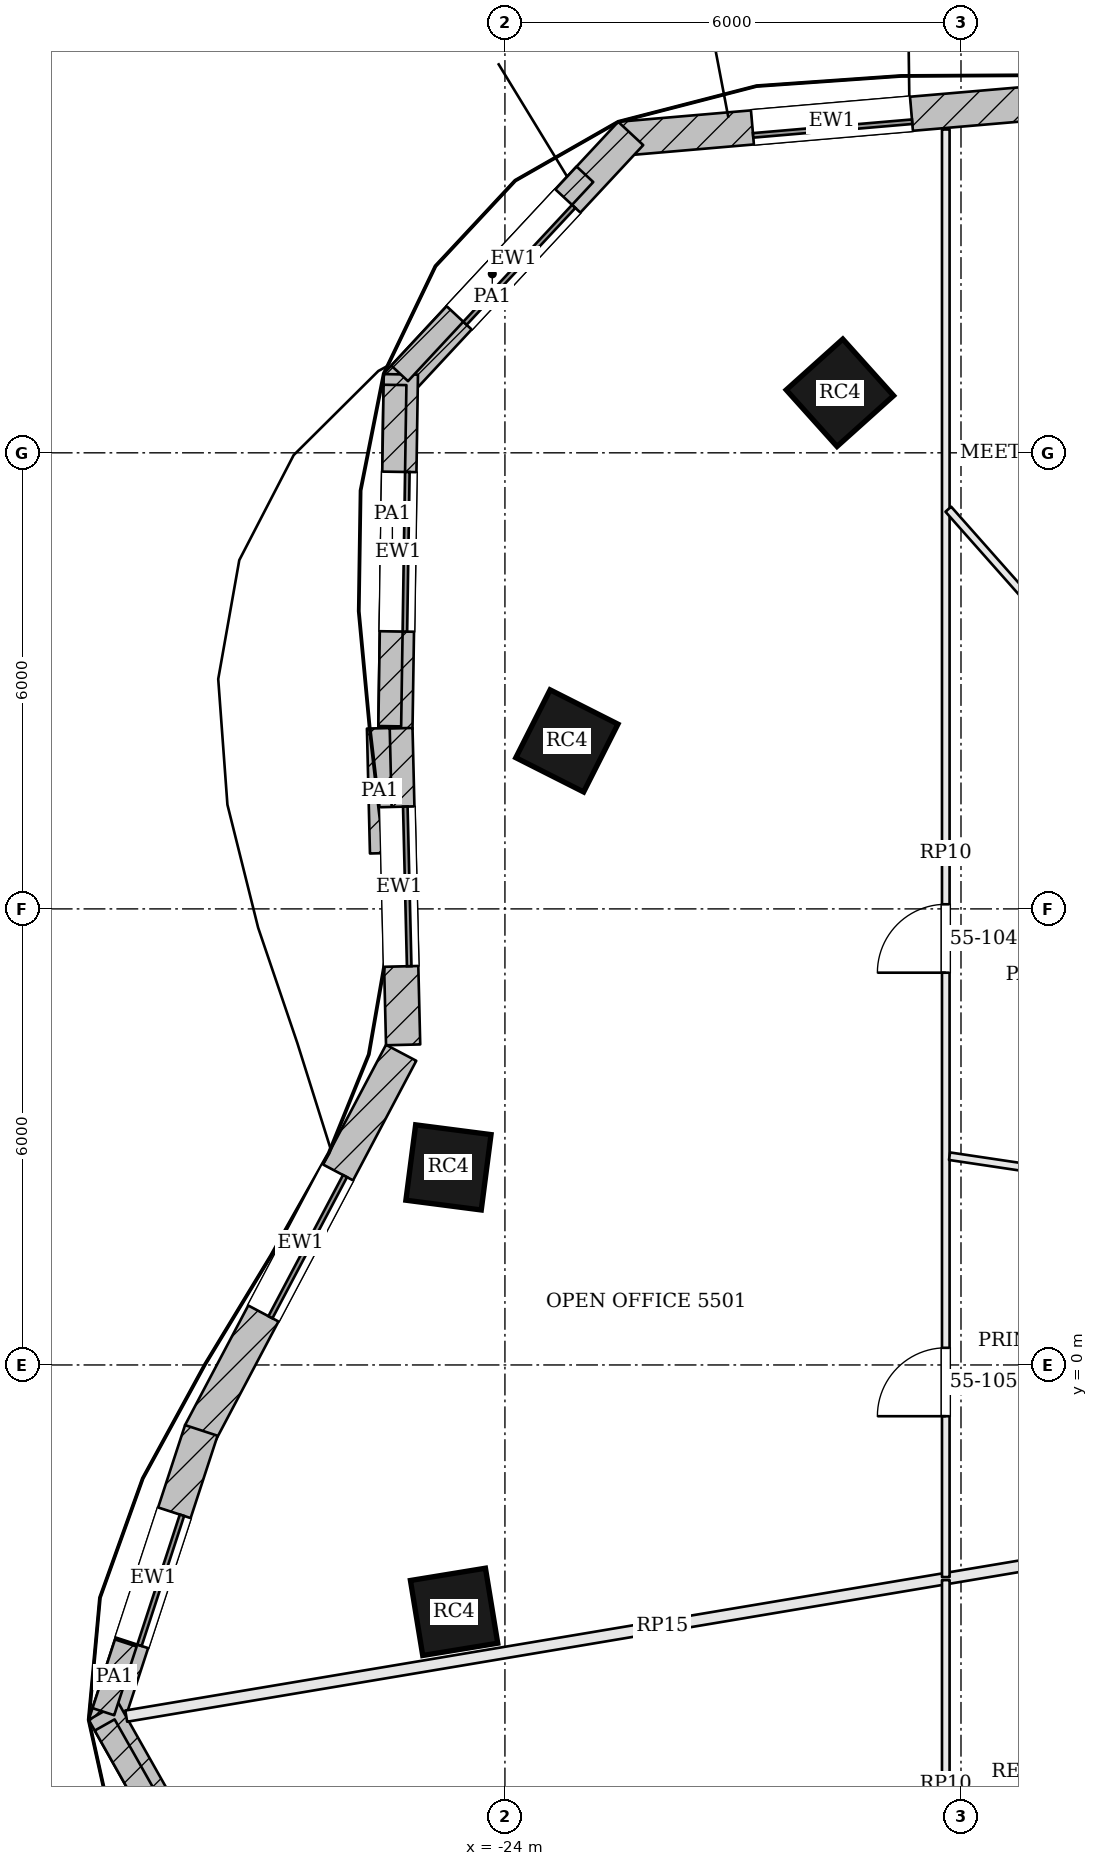
"""IFC4 building model, lengths in metres.
Left out: names, types, materials, properties, quantities, classifications, styles, units other than length and angle.
Written with IfcOpenShell. Run it as: python <this file> out.ifc"""

import sys

from ifc_helpers import new_model, si_unit, direction, frame, frame_2d, origin, origin_2d, place, context, subcontext, project, spatial, rectangle, extrude, element, fill, save


model = new_model("IFC4")
c1 = context("Model", 3, precision=1e-05, world=origin(), true_north=direction((0.0, 1.0)))
c2 = subcontext(c1, "Body", "Model", "MODEL_VIEW")
j1 = project(units=[si_unit("LENGTHUNIT", "METRE"), si_unit("PLANEANGLEUNIT", "RADIAN")], contexts=[c1])
p1 = place(None, origin())
s1 = spatial("IfcSite", under=j1, at=p1, CompositionType="ELEMENT")
p2 = place(p1, origin())
s2 = spatial("IfcBuilding", under=s1, at=p2, CompositionType="ELEMENT")
p3 = place(p2, frame((0.0, 0.0, 225.3)))
s3 = spatial("IfcBuildingStorey", under=s2, at=p3, CompositionType="ELEMENT", Elevation=225.3)
for number, where, z_axis, x_axis in (
    (1, (-19.593, 12.79, 0.0), (0.0, 0.0, 1.0), (-0.744, -0.668, 0.0)),
    (2, (-23.185, 8.21, 0.0), (0.0, 0.0, 1.0), (-0.451, -0.893, 0.0)),
    (3, (-24.743, 2.599, 0.0), (0.0, 0.0, 1.0), (-0.128, -0.992, 0.0)),
    (4, (-24.669, -3.248, 0.0), (0.0, 0.0, 1.0), (0.162, -0.987, 0.0)),
):
    element("IfcColumn", number, at=place(p3, frame(where, z_axis=z_axis, x_axis=x_axis)), inside=s3, PredefinedType="COLUMN", context=c2, shape_type="SweptSolid", body=[
        extrude(rectangle(XDim=1.0, YDim=1.0, at=origin_2d()), origin(), (0.0, 0.0, 1.0), 3.9),
    ])
p4 = place(p3, frame((-16.91, 16.61, 0.0), z_axis=(0.0, 0.0, 1.0), x_axis=(-0.996333165816, -0.085558299972, 0.0)))
e5 = element("IfcWall", 5, at=p4, inside=s3, PredefinedType="SOLIDWALL", context=c2, shape_type="SweptSolid", body=[
    extrude(rectangle(XDim=5.596, YDim=0.45, at=frame_2d((2.798, 0.0))), origin(), (0.0, 0.0, 1.0), 3.7),
])
p5 = place(p4, frame((1.748, 0.0, 0.9)))
e6 = element("IfcOpeningElement", 6, at=p5, cuts=e5, PredefinedType="OPENING", context=c2, shape_type="SweptSolid", body=[
    extrude(rectangle(XDim=2.1, YDim=2.3, at=frame_2d((1.05, 1.15))), frame((0.0, 0.235, 0.0), z_axis=(0.0, -1.0, 0.0), x_axis=(1.0, 0.0, 0.0)), (0.0, 0.0, 1.0), 0.47),
])
p6 = place(p3, frame((-22.345, 16.202, 0.0), z_axis=(0.0, 0.0, 1.0), x_axis=(-0.681249161265, -0.732051624051, 0.0)))
e7 = element("IfcWall", 7, at=p6, inside=s3, PredefinedType="SOLIDWALL", context=c2, shape_type="SweptSolid", body=[
    extrude(rectangle(XDim=4.527, YDim=0.45, at=frame_2d((2.263, 0.0))), origin(), (0.0, 0.0, 1.0), 3.7),
])
p7 = place(p6, frame((1.213, 0.0, 0.9)))
e8 = element("IfcOpeningElement", 8, at=p7, cuts=e7, PredefinedType="OPENING", context=c2, shape_type="SweptSolid", body=[
    extrude(rectangle(XDim=2.1, YDim=2.3, at=frame_2d((1.05, 1.15))), frame((0.0, 0.235, 0.0), z_axis=(0.0, -1.0, 0.0), x_axis=(1.0, 0.0, 0.0)), (0.0, 0.0, 1.0), 0.47),
])
p8 = place(p3, frame((-25.369, 13.032, 0.0), z_axis=(0.0, 0.0, 1.0), x_axis=(-0.015383599855, -0.999881665426, 0.0)))
e9 = element("IfcWall", 9, at=p8, inside=s3, PredefinedType="SOLIDWALL", context=c2, shape_type="SweptSolid", body=[
    extrude(rectangle(XDim=4.666, YDim=0.45, at=frame_2d((2.333, 0.0))), origin(), (0.0, 0.0, 1.0), 3.7),
])
p9 = place(p8, frame((1.283, 0.0, 0.9)))
e10 = element("IfcOpeningElement", 10, at=p9, cuts=e9, PredefinedType="OPENING", context=c2, shape_type="SweptSolid", body=[
    extrude(rectangle(XDim=2.1, YDim=2.3, at=frame_2d((1.05, 1.15))), frame((0.0, 0.235, 0.0), z_axis=(0.0, -1.0, 0.0), x_axis=(1.0, 0.0, 0.0)), (0.0, 0.0, 1.0), 0.47),
])
p10 = place(p3, frame((-25.441, 8.375, 0.0), z_axis=(0.0, 0.0, 1.0), x_axis=(0.024385850259, -0.999702620936, 0.0)))
e11 = element("IfcWall", 11, at=p10, inside=s3, PredefinedType="SOLIDWALL", context=c2, shape_type="SweptSolid", body=[
    extrude(rectangle(XDim=4.165, YDim=0.45, at=frame_2d((2.083, 0.0))), origin(), (0.0, 0.0, 1.0), 3.7),
])
p11 = place(p10, frame((1.032, 0.0, 0.9)))
e12 = element("IfcOpeningElement", 12, at=p11, cuts=e11, PredefinedType="OPENING", context=c2, shape_type="SweptSolid", body=[
    extrude(rectangle(XDim=2.1, YDim=2.3, at=frame_2d((1.05, 1.15))), frame((0.0, 0.235, 0.0), z_axis=(0.0, -1.0, 0.0), x_axis=(1.0, 0.0, 0.0)), (0.0, 0.0, 1.0), 0.47),
])
p12 = place(p3, frame((-25.365, 4.107, 0.0), z_axis=(0.0, 0.0, 1.0), x_axis=(-0.467239399168, -0.884130840919, 0.0)))
e13 = element("IfcWall", 13, at=p12, inside=s3, PredefinedType="SOLIDWALL", context=c2, shape_type="SweptSolid", body=[
    extrude(rectangle(XDim=5.659, YDim=0.45, at=frame_2d((2.83, 0.0))), origin(), (0.0, 0.0, 1.0), 3.7),
])
p13 = place(p12, frame((1.779, 0.0, 0.9)))
e14 = element("IfcOpeningElement", 14, at=p13, cuts=e13, PredefinedType="OPENING", context=c2, shape_type="SweptSolid", body=[
    extrude(rectangle(XDim=2.1, YDim=2.3, at=frame_2d((1.05, 1.15))), frame((0.0, 0.235, 0.0), z_axis=(0.0, -1.0, 0.0), x_axis=(1.0, 0.0, 0.0)), (0.0, 0.0, 1.0), 0.47),
])
p14 = place(p3, frame((-27.995, -0.861, 0.0), z_axis=(0.0, 0.0, 1.0), x_axis=(-0.310693110673, -0.950510279261, 0.0)))
e15 = element("IfcWall", 15, at=p14, inside=s3, PredefinedType="SOLIDWALL", context=c2, shape_type="SweptSolid", body=[
    extrude(rectangle(XDim=4.08, YDim=0.45, at=frame_2d((2.04, 0.0))), origin(), (0.0, 0.0, 1.0), 3.7),
])
p15 = place(p14, frame((1.14, 0.0, 0.9)))
e16 = element("IfcOpeningElement", 16, at=p15, cuts=e15, PredefinedType="OPENING", context=c2, shape_type="SweptSolid", body=[
    extrude(rectangle(XDim=1.8, YDim=2.3, at=frame_2d((0.9, 1.15))), frame((0.0, 0.235, 0.0), z_axis=(0.0, -1.0, 0.0), x_axis=(1.0, 0.0, 0.0)), (0.0, 0.0, 1.0), 0.47),
])
p16 = place(p3, frame((-29.28, -4.558, 0.0), z_axis=(0.0, 0.0, 1.0), x_axis=(0.491511608999, -0.870871022723, 0.0)))
e17 = element("IfcWall", 17, at=p16, inside=s3, PredefinedType="SOLIDWALL", context=c2, shape_type="SweptSolid", body=[
    extrude(rectangle(XDim=4.763, YDim=0.45, at=frame_2d((2.381, 0.0))), origin(), (0.0, 0.0, 1.0), 3.7),
])
p17 = place(p16, frame((1.332, 0.0, 0.9)))
e18 = element("IfcOpeningElement", 18, at=p17, cuts=e17, PredefinedType="OPENING", context=c2, shape_type="SweptSolid", body=[
    extrude(rectangle(XDim=2.1, YDim=2.3, at=frame_2d((1.05, 1.15))), frame((0.0, 0.235, 0.0), z_axis=(0.0, -1.0, 0.0), x_axis=(1.0, 0.0, 0.0)), (0.0, 0.0, 1.0), 0.47),
])
p18 = place(p3, frame((-22.948, 15.665, 3.9), z_axis=(0.0, 0.0, 1.0), x_axis=(-0.681269800001, -0.732032417046, 0.0)))
e19 = element("IfcWall", 19, at=p18, inside=s3, PredefinedType="PARAPET", context=c2, shape_type="SweptSolid", body=[
    extrude(rectangle(XDim=3.578, YDim=0.3, at=frame_2d((1.789, 0.0))), origin(), (0.0, 0.0, 1.0), 1.1),
])
p19 = place(p3, frame((-25.446, 12.893, 3.9), z_axis=(0.0, 0.0, 1.0), x_axis=(-0.015386139974, -0.999881626342, 0.0)))
e20 = element("IfcWall", 20, at=p19, inside=s3, PredefinedType="PARAPET", context=c2, shape_type="SweptSolid", body=[
    extrude(rectangle(XDim=4.49, YDim=0.3, at=frame_2d((2.245, 0.0))), origin(), (0.0, 0.0, 1.0), 1.1),
])
p20 = place(p3, frame((-25.666, 8.376, 3.9), z_axis=(0.0, 0.0, 1.0), x_axis=(0.024357650064, -0.999703308429, 0.0)))
e21 = element("IfcWall", 21, at=p20, inside=s3, PredefinedType="PARAPET", context=c2, shape_type="SweptSolid", body=[
    extrude(rectangle(XDim=1.644, YDim=0.3, at=frame_2d((0.822, 0.0))), origin(), (0.0, 0.0, 1.0), 1.1),
])
p21 = place(p3, frame((-28.988, -3.657, 3.9), z_axis=(0.0, 0.0, 1.0), x_axis=(-0.310832502734, -0.950464704891, 0.0)))
e22 = element("IfcWall", 22, at=p21, inside=s3, PredefinedType="PARAPET", context=c2, shape_type="SweptSolid", body=[
    extrude(rectangle(XDim=0.951, YDim=0.3, at=frame_2d((0.476, 0.0))), origin(), (0.0, 0.0, 1.0), 1.1),
])
p22 = place(p3, frame((-29.266, -4.737, 3.9), z_axis=(0.0, 0.0, 1.0), x_axis=(0.491480740547, -0.870888443873, 0.0)))
e23 = element("IfcWall", 23, at=p22, inside=s3, PredefinedType="PARAPET", context=c2, shape_type="SweptSolid", body=[
    extrude(rectangle(XDim=4.494, YDim=0.3, at=frame_2d((2.247, 0.0))), origin(), (0.0, 0.0, 1.0), 1.1),
])
p23 = place(p3, frame((-28.982, -4.62, 0.0), z_axis=(0.0, 0.0, 1.0), x_axis=(0.986213908907, 0.165475454008, 0.0)))
e24 = element("IfcWall", 24, at=p23, inside=s3, PredefinedType="PARTITIONING", context=c2, shape_type="SweptSolid", body=[
    extrude(rectangle(XDim=14.305, YDim=0.15, at=frame_2d((7.153, 0.0))), origin(), (0.0, 0.0, 1.0), 3.184),
])
p24 = place(p3, frame((-18.2, -2.79, 0.0), z_axis=(0.0, 0.0, 1.0), x_axis=(0.0, 1.0, 0.0)))
e25 = element("IfcWall", 25, at=p24, inside=s3, PredefinedType="PARTITIONING", context=c2, shape_type="SweptSolid", body=[
    extrude(rectangle(XDim=19.044, YDim=0.1, at=frame_2d((9.522, 0.0))), origin(), (0.0, 0.0, 1.0), 3.084),
])
p25 = place(p24, frame((7.951, 0.0, 0.0)))
e26 = element("IfcOpeningElement", 26, at=p25, cuts=e25, PredefinedType="OPENING", context=c2, shape_type="SweptSolid", body=[
    extrude(rectangle(XDim=0.9, YDim=2.1, at=frame_2d((0.45, 1.05))), frame((0.0, 0.06, 0.0), z_axis=(0.0, -1.0, 0.0), x_axis=(1.0, 0.0, 0.0)), (0.0, 0.0, 1.0), 0.12),
])
p26 = place(p24, frame((2.116, 0.0, 0.0)))
e27 = element("IfcOpeningElement", 27, at=p26, cuts=e25, PredefinedType="OPENING", context=c2, shape_type="SweptSolid", body=[
    extrude(rectangle(XDim=0.9, YDim=2.1, at=frame_2d((0.45, 1.05))), frame((0.0, 0.06, 0.0), z_axis=(0.0, -1.0, 0.0), x_axis=(1.0, 0.0, 0.0)), (0.0, 0.0, 1.0), 0.12),
])
p27 = place(p3, frame((-14.85, 7.514, 0.0), z_axis=(0.0, 0.0, 1.0), x_axis=(-0.663136045348, 0.748498888015, 0.0)))
e28 = element("IfcWall", 28, at=p27, inside=s3, PredefinedType="PARTITIONING", context=c2, shape_type="SweptSolid", body=[
    extrude(rectangle(XDim=5.002, YDim=0.1, at=frame_2d((2.501, 0.0))), origin(), (0.0, 0.0, 1.0), 3.084),
])
p28 = place(p3, frame((-14.874, 2.257, 0.0), z_axis=(0.0, 0.0, 1.0), x_axis=(-0.989042600295, 0.147630399314, 0.0)))
e29 = element("IfcWall", 29, at=p28, inside=s3, PredefinedType="PARTITIONING", context=c2, shape_type="SweptSolid", body=[
    extrude(rectangle(XDim=3.312, YDim=0.1, at=frame_2d((1.656, 0.0))), origin(), (0.0, 0.0, 1.0), 3.084),
])
p29 = place(p3, frame((-18.2, -8.2, 0.0), z_axis=(0.0, 0.0, 1.0), x_axis=(0.0, 1.0, 0.0)))
e30 = element("IfcWall", 30, at=p29, inside=s3, PredefinedType="PARTITIONING", context=c2, shape_type="SweptSolid", body=[
    extrude(rectangle(XDim=5.369, YDim=0.1, at=frame_2d((2.685, 0.0))), origin(), (0.0, 0.0, 1.0), 3.084),
])
p30 = place(p5, origin())
e31 = element("IfcWindow", 31, at=p30, inside=s3, PartitioningType="SINGLE_PANEL", PredefinedType="WINDOW", context=c2, shape_type="SweptSolid", body=[
    extrude(rectangle(XDim=2.1, YDim=2.3, at=frame_2d((1.05, 1.15))), frame((0.0, 0.135, 0.0), z_axis=(0.0, -1.0, 0.0), x_axis=(1.0, 0.0, 0.0)), (0.0, 0.0, 1.0), 0.06),
])
fill(e6, e31)
p31 = place(p7, origin())
e32 = element("IfcWindow", 32, at=p31, inside=s3, PartitioningType="SINGLE_PANEL", PredefinedType="WINDOW", context=c2, shape_type="SweptSolid", body=[
    extrude(rectangle(XDim=2.1, YDim=2.3, at=frame_2d((1.05, 1.15))), frame((0.0, 0.135, 0.0), z_axis=(0.0, -1.0, 0.0), x_axis=(1.0, 0.0, 0.0)), (0.0, 0.0, 1.0), 0.06),
])
fill(e8, e32)
p32 = place(p9, origin())
e33 = element("IfcWindow", 33, at=p32, inside=s3, PartitioningType="SINGLE_PANEL", PredefinedType="WINDOW", context=c2, shape_type="SweptSolid", body=[
    extrude(rectangle(XDim=2.1, YDim=2.3, at=frame_2d((1.05, 1.15))), frame((0.0, 0.135, 0.0), z_axis=(0.0, -1.0, 0.0), x_axis=(1.0, 0.0, 0.0)), (0.0, 0.0, 1.0), 0.06),
])
fill(e10, e33)
p33 = place(p11, origin())
e34 = element("IfcWindow", 34, at=p33, inside=s3, PartitioningType="SINGLE_PANEL", PredefinedType="WINDOW", context=c2, shape_type="SweptSolid", body=[
    extrude(rectangle(XDim=2.1, YDim=2.3, at=frame_2d((1.05, 1.15))), frame((0.0, 0.135, 0.0), z_axis=(0.0, -1.0, 0.0), x_axis=(1.0, 0.0, 0.0)), (0.0, 0.0, 1.0), 0.06),
])
fill(e12, e34)
p34 = place(p13, origin())
e35 = element("IfcWindow", 35, at=p34, inside=s3, PartitioningType="SINGLE_PANEL", PredefinedType="WINDOW", context=c2, shape_type="SweptSolid", body=[
    extrude(rectangle(XDim=2.1, YDim=2.3, at=frame_2d((1.05, 1.15))), frame((0.0, 0.135, 0.0), z_axis=(0.0, -1.0, 0.0), x_axis=(1.0, 0.0, 0.0)), (0.0, 0.0, 1.0), 0.06),
])
fill(e14, e35)
p35 = place(p15, origin())
e36 = element("IfcWindow", 36, at=p35, inside=s3, PartitioningType="SINGLE_PANEL", PredefinedType="WINDOW", context=c2, shape_type="SweptSolid", body=[
    extrude(rectangle(XDim=1.8, YDim=2.3, at=frame_2d((0.9, 1.15))), frame((0.0, 0.135, 0.0), z_axis=(0.0, -1.0, 0.0), x_axis=(1.0, 0.0, 0.0)), (0.0, 0.0, 1.0), 0.06),
])
fill(e16, e36)
p36 = place(p25, origin())
e37 = element("IfcDoor", 37, at=p36, inside=s3, OperationType="SINGLE_SWING_LEFT", PredefinedType="DOOR", context=c2, shape_type="SweptSolid", body=[
    extrude(rectangle(XDim=0.9, YDim=2.1, at=frame_2d((0.45, 1.05))), frame((0.0, 0.025, 0.0), z_axis=(0.0, -1.0, 0.0), x_axis=(1.0, 0.0, 0.0)), (0.0, 0.0, 1.0), 0.05),
])
fill(e26, e37)
p37 = place(p26, origin())
e38 = element("IfcDoor", 38, at=p37, inside=s3, OperationType="SINGLE_SWING_LEFT", PredefinedType="DOOR", context=c2, shape_type="SweptSolid", body=[
    extrude(rectangle(XDim=0.9, YDim=2.1, at=frame_2d((0.45, 1.05))), frame((0.0, 0.025, 0.0), z_axis=(0.0, -1.0, 0.0), x_axis=(1.0, 0.0, 0.0)), (0.0, 0.0, 1.0), 0.05),
])
fill(e27, e38)
save(model, sys.argv[1])
